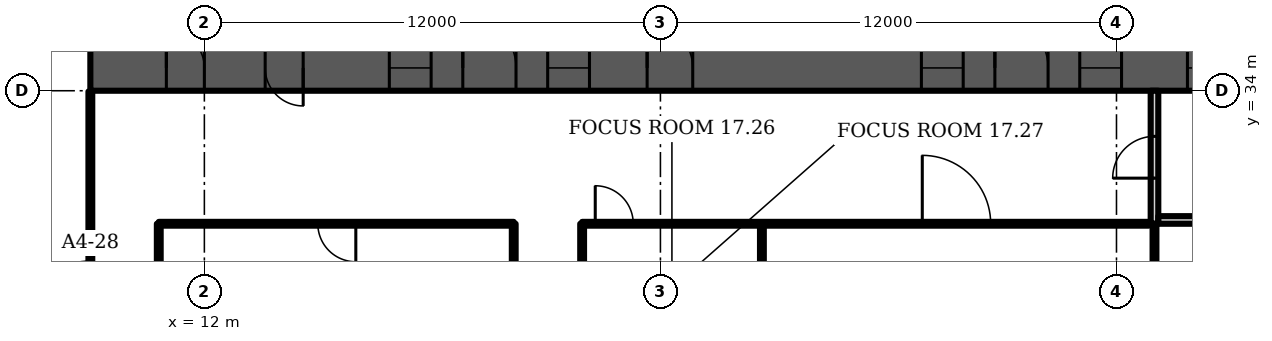
"""IFC4 building model, lengths in metres.
Left out: names, types, materials, properties, quantities, classifications, styles, units other than length and angle.
Written with IfcOpenShell. Run it as: python <this file> out.ifc"""

import sys

from ifc_helpers import new_model, si_unit, direction, frame, frame_2d, origin, place, context, subcontext, project, spatial, rectangle, extrude, element, fill, save


model = new_model("IFC4")
c1 = context("Model", 3, precision=1e-05, world=origin(), true_north=direction((0.0, 1.0)))
c2 = subcontext(c1, "Body", "Model", "MODEL_VIEW")
j1 = project(units=[si_unit("LENGTHUNIT", "METRE"), si_unit("PLANEANGLEUNIT", "RADIAN")], contexts=[c1])
p1 = place(None, origin())
s1 = spatial("IfcSite", under=j1, at=p1, CompositionType="ELEMENT")
p2 = place(p1, origin())
s2 = spatial("IfcBuilding", under=s1, at=p2, CompositionType="ELEMENT")
p3 = place(p2, frame((0.0, 0.0, 81.1)))
s3 = spatial("IfcBuildingStorey", under=s2, at=p3, CompositionType="ELEMENT", Elevation=81.1)
p4 = place(p3, frame((9.0, 34.6, 0.0), z_axis=(0.0, 0.0, 1.0), x_axis=(1.0, 0.0, 0.0)))
e1 = element("IfcWall", 1, at=p4, inside=s3, PredefinedType="SHEAR", context=c2, shape_type="SweptSolid", body=[
    extrude(rectangle(XDim=56.0, YDim=1.2, at=frame_2d((28.0, 0.0))), origin(), (0.0, 0.0, 1.0), 3.6),
])
p5 = place(p4, frame((2.0, 0.0, 0.0)))
e2 = element("IfcOpeningElement", 2, at=p5, cuts=e1, PredefinedType="OPENING", context=c2, shape_type="SweptSolid", body=[
    extrude(rectangle(XDim=1.0, YDim=2.1, at=frame_2d((0.5, 1.05))), frame((0.0, 0.61, 0.0), z_axis=(0.0, -1.0, 0.0), x_axis=(1.0, 0.0, 0.0)), (0.0, 0.0, 1.0), 1.22),
])
p6 = place(p4, frame((4.6, 0.0, 0.0)))
e3 = element("IfcOpeningElement", 3, at=p6, cuts=e1, PredefinedType="OPENING", context=c2, shape_type="SweptSolid", body=[
    extrude(rectangle(XDim=1.0, YDim=2.1, at=frame_2d((0.5, 1.05))), frame((0.0, 0.61, 0.0), z_axis=(0.0, -1.0, 0.0), x_axis=(1.0, 0.0, 0.0)), (0.0, 0.0, 1.0), 1.22),
])
p7 = place(p4, frame((7.867, 0.0, 0.0)))
e4 = element("IfcOpeningElement", 4, at=p7, cuts=e1, PredefinedType="OPENING", context=c2, shape_type="SweptSolid", body=[
    extrude(rectangle(XDim=1.1, YDim=2.1, at=frame_2d((0.55, 1.05))), frame((0.0, 0.61, 0.0), z_axis=(0.0, -1.0, 0.0), x_axis=(1.0, 0.0, 0.0)), (0.0, 0.0, 1.0), 1.22),
])
p8 = place(p4, frame((12.033, 0.0, 0.0)))
e5 = element("IfcOpeningElement", 5, at=p8, cuts=e1, PredefinedType="OPENING", context=c2, shape_type="SweptSolid", body=[
    extrude(rectangle(XDim=1.1, YDim=2.1, at=frame_2d((0.55, 1.05))), frame((0.0, 0.61, 0.0), z_axis=(0.0, -1.0, 0.0), x_axis=(1.0, 0.0, 0.0)), (0.0, 0.0, 1.0), 1.22),
])
p9 = place(p4, frame((9.8, 0.0, 0.0)))
e6 = element("IfcOpeningElement", 6, at=p9, cuts=e1, PredefinedType="OPENING", context=c2, shape_type="SweptSolid", body=[
    extrude(rectangle(XDim=1.4, YDim=2.1, at=frame_2d((0.7, 1.05))), frame((0.0, 0.61, 0.0), z_axis=(0.0, -1.0, 0.0), x_axis=(1.0, 0.0, 0.0)), (0.0, 0.0, 1.0), 1.22),
])
p10 = place(p4, frame((14.65, 0.0, 0.0)))
e7 = element("IfcOpeningElement", 7, at=p10, cuts=e1, PredefinedType="OPENING", context=c2, shape_type="SweptSolid", body=[
    extrude(rectangle(XDim=1.2, YDim=2.1, at=frame_2d((0.6, 1.05))), frame((0.0, 0.61, 0.0), z_axis=(0.0, -1.0, 0.0), x_axis=(1.0, 0.0, 0.0)), (0.0, 0.0, 1.0), 1.22),
])
p11 = place(p4, frame((21.867, 0.0, 0.0)))
e8 = element("IfcOpeningElement", 8, at=p11, cuts=e1, PredefinedType="OPENING", context=c2, shape_type="SweptSolid", body=[
    extrude(rectangle(XDim=1.1, YDim=2.1, at=frame_2d((0.55, 1.05))), frame((0.0, 0.61, 0.0), z_axis=(0.0, -1.0, 0.0), x_axis=(1.0, 0.0, 0.0)), (0.0, 0.0, 1.0), 1.22),
])
p12 = place(p4, frame((26.033, 0.0, 0.0)))
e9 = element("IfcOpeningElement", 9, at=p12, cuts=e1, PredefinedType="OPENING", context=c2, shape_type="SweptSolid", body=[
    extrude(rectangle(XDim=1.1, YDim=2.1, at=frame_2d((0.55, 1.05))), frame((0.0, 0.61, 0.0), z_axis=(0.0, -1.0, 0.0), x_axis=(1.0, 0.0, 0.0)), (0.0, 0.0, 1.0), 1.22),
])
p13 = place(p4, frame((23.8, 0.0, 0.0)))
e10 = element("IfcOpeningElement", 10, at=p13, cuts=e1, PredefinedType="OPENING", context=c2, shape_type="SweptSolid", body=[
    extrude(rectangle(XDim=1.4, YDim=2.1, at=frame_2d((0.7, 1.05))), frame((0.0, 0.61, 0.0), z_axis=(0.0, -1.0, 0.0), x_axis=(1.0, 0.0, 0.0)), (0.0, 0.0, 1.0), 1.22),
])
p14 = place(p4, frame((28.867, 0.0, 0.0)))
e11 = element("IfcOpeningElement", 11, at=p14, cuts=e1, PredefinedType="OPENING", context=c2, shape_type="SweptSolid", body=[
    extrude(rectangle(XDim=1.1, YDim=2.1, at=frame_2d((0.55, 1.05))), frame((0.0, 0.61, 0.0), z_axis=(0.0, -1.0, 0.0), x_axis=(1.0, 0.0, 0.0)), (0.0, 0.0, 1.0), 1.22),
])
p15 = place(p4, frame((33.033, 0.0, 0.0)))
e12 = element("IfcOpeningElement", 12, at=p15, cuts=e1, PredefinedType="OPENING", context=c2, shape_type="SweptSolid", body=[
    extrude(rectangle(XDim=1.1, YDim=2.1, at=frame_2d((0.55, 1.05))), frame((0.0, 0.61, 0.0), z_axis=(0.0, -1.0, 0.0), x_axis=(1.0, 0.0, 0.0)), (0.0, 0.0, 1.0), 1.22),
])
p16 = place(p4, frame((40.15, 0.0, 0.0)))
e13 = element("IfcOpeningElement", 13, at=p16, cuts=e1, PredefinedType="OPENING", context=c2, shape_type="SweptSolid", body=[
    extrude(rectangle(XDim=1.2, YDim=2.1, at=frame_2d((0.6, 1.05))), frame((0.0, 0.61, 0.0), z_axis=(0.0, -1.0, 0.0), x_axis=(1.0, 0.0, 0.0)), (0.0, 0.0, 1.0), 1.22),
])
p17 = place(p4, frame((44.8, 0.0, 0.0)))
e14 = element("IfcOpeningElement", 14, at=p17, cuts=e1, PredefinedType="OPENING", context=c2, shape_type="SweptSolid", body=[
    extrude(rectangle(XDim=1.4, YDim=2.1, at=frame_2d((0.7, 1.05))), frame((0.0, 0.61, 0.0), z_axis=(0.0, -1.0, 0.0), x_axis=(1.0, 0.0, 0.0)), (0.0, 0.0, 1.0), 1.22),
])
p18 = place(p4, frame((49.867, 0.0, 0.0)))
e15 = element("IfcOpeningElement", 15, at=p18, cuts=e1, PredefinedType="OPENING", context=c2, shape_type="SweptSolid", body=[
    extrude(rectangle(XDim=1.1, YDim=2.1, at=frame_2d((0.55, 1.05))), frame((0.0, 0.61, 0.0), z_axis=(0.0, -1.0, 0.0), x_axis=(1.0, 0.0, 0.0)), (0.0, 0.0, 1.0), 1.22),
])
p19 = place(p4, frame((53.5, 0.0, 0.0)))
e16 = element("IfcOpeningElement", 16, at=p19, cuts=e1, PredefinedType="OPENING", context=c2, shape_type="SweptSolid", body=[
    extrude(rectangle(XDim=1.1, YDim=2.1, at=frame_2d((0.55, 1.05))), frame((0.0, 0.61, 0.0), z_axis=(0.0, -1.0, 0.0), x_axis=(1.0, 0.0, 0.0)), (0.0, 0.0, 1.0), 1.22),
])
p20 = place(p4, frame((51.567, 0.0, 0.0)))
e17 = element("IfcOpeningElement", 17, at=p20, cuts=e1, PredefinedType="OPENING", context=c2, shape_type="SweptSolid", body=[
    extrude(rectangle(XDim=1.4, YDim=2.1, at=frame_2d((0.7, 1.05))), frame((0.0, 0.61, 0.0), z_axis=(0.0, -1.0, 0.0), x_axis=(1.0, 0.0, 0.0)), (0.0, 0.0, 1.0), 1.22),
])
p21 = place(p3, frame((37.0, 30.5, 0.0), z_axis=(0.0, 0.0, 1.0), x_axis=(0.0, 1.0, 0.0)))
e18 = element("IfcWall", 18, at=p21, inside=s3, PredefinedType="PARTITIONING", context=c2, shape_type="SweptSolid", body=[
    extrude(rectangle(XDim=3.5, YDim=0.2, at=frame_2d((1.75, 0.0))), origin(), (0.0, 0.0, 1.0), 3.2),
])
p22 = place(p21, frame((1.2, 0.0, 0.0)))
e19 = element("IfcOpeningElement", 19, at=p22, cuts=e18, PredefinedType="OPENING", context=c2, shape_type="SweptSolid", body=[
    extrude(rectangle(XDim=1.1, YDim=2.1, at=frame_2d((0.55, 1.05))), frame((0.0, 0.11, 0.0), z_axis=(0.0, -1.0, 0.0), x_axis=(1.0, 0.0, 0.0)), (0.0, 0.0, 1.0), 0.22),
])
p23 = place(p3, frame((37.1, 30.6, 0.0), z_axis=(0.0, 0.0, 1.0), x_axis=(1.0, 0.0, 0.0)))
e20 = element("IfcWall", 20, at=p23, inside=s3, PredefinedType="PARTITIONING", context=c2, shape_type="SweptSolid", body=[
    extrude(rectangle(XDim=2.8, YDim=0.2, at=frame_2d((1.4, 0.0))), origin(), (0.0, 0.0, 1.0), 3.2),
])
p24 = place(p3, frame((9.0, 26.02, 0.0), z_axis=(0.0, 0.0, 1.0), x_axis=(0.0, 1.0, 0.0)))
e21 = element("IfcWall", 21, at=p24, inside=s3, PredefinedType="PARTITIONING", context=c2, shape_type="SweptSolid", body=[
    extrude(rectangle(XDim=7.96, YDim=0.1, at=frame_2d((3.98, 0.0))), origin(), (0.0, 0.0, 1.0), 3.2),
])
p25 = place(p24, frame((1.7, 0.0, 0.0)))
e22 = element("IfcOpeningElement", 22, at=p25, cuts=e21, PredefinedType="OPENING", context=c2, shape_type="SweptSolid", body=[
    extrude(rectangle(XDim=1.8, YDim=2.1, at=frame_2d((0.9, 1.05))), frame((0.0, 0.06, 0.0), z_axis=(0.0, -1.0, 0.0), x_axis=(1.0, 0.0, 0.0)), (0.0, 0.0, 1.0), 0.12),
])
p26 = place(p3, frame((10.8, 21.6, 0.0), z_axis=(0.0, 0.0, 1.0), x_axis=(0.0, 1.0, 0.0)))
e23 = element("IfcWall", 23, at=p26, inside=s3, PredefinedType="PARTITIONING", context=c2, shape_type="SweptSolid", body=[
    extrude(rectangle(XDim=8.9, YDim=0.1, at=frame_2d((4.45, 0.0))), origin(), (0.0, 0.0, 1.0), 3.2),
])
p27 = place(p3, frame((10.8, 30.5, 0.0), z_axis=(0.0, 0.0, 1.0), x_axis=(1.0, 0.0, 0.0)))
e24 = element("IfcWall", 24, at=p27, inside=s3, PredefinedType="PARTITIONING", context=c2, shape_type="SweptSolid", body=[
    extrude(rectangle(XDim=9.34, YDim=0.1, at=frame_2d((4.67, 0.0))), origin(), (0.0, 0.0, 1.0), 3.2),
])
p28 = place(p27, frame((4.185, 0.0, 0.0)))
e25 = element("IfcOpeningElement", 25, at=p28, cuts=e24, PredefinedType="OPENING", context=c2, shape_type="SweptSolid", body=[
    extrude(rectangle(XDim=1.0, YDim=2.1, at=frame_2d((0.5, 1.05))), frame((0.0, 0.06, 0.0), z_axis=(0.0, -1.0, 0.0), x_axis=(1.0, 0.0, 0.0)), (0.0, 0.0, 1.0), 0.12),
])
p29 = place(p3, frame((20.14, -1.13, 0.0), z_axis=(0.0, 0.0, 1.0), x_axis=(0.0, 1.0, 0.0)))
e26 = element("IfcWall", 26, at=p29, inside=s3, PredefinedType="PARTITIONING", context=c2, shape_type="SweptSolid", body=[
    extrude(rectangle(XDim=31.63, YDim=0.1, at=frame_2d((15.815, 0.0))), origin(), (0.0, 0.0, 1.0), 3.2),
])
p30 = place(p29, frame((1.825, 0.0, 0.0)))
e27 = element("IfcOpeningElement", 27, at=p30, cuts=e26, PredefinedType="OPENING", context=c2, shape_type="SweptSolid", body=[
    extrude(rectangle(XDim=1.0, YDim=2.1, at=frame_2d((0.5, 1.05))), frame((0.0, 0.06, 0.0), z_axis=(0.0, -1.0, 0.0), x_axis=(1.0, 0.0, 0.0)), (0.0, 0.0, 1.0), 0.12),
])
p31 = place(p29, frame((6.305, 0.0, 0.0)))
e28 = element("IfcOpeningElement", 28, at=p31, cuts=e26, PredefinedType="OPENING", context=c2, shape_type="SweptSolid", body=[
    extrude(rectangle(XDim=1.0, YDim=2.1, at=frame_2d((0.5, 1.05))), frame((0.0, 0.06, 0.0), z_axis=(0.0, -1.0, 0.0), x_axis=(1.0, 0.0, 0.0)), (0.0, 0.0, 1.0), 0.12),
])
p32 = place(p29, frame((11.35, 0.0, 0.0)))
e29 = element("IfcOpeningElement", 29, at=p32, cuts=e26, PredefinedType="OPENING", context=c2, shape_type="SweptSolid", body=[
    extrude(rectangle(XDim=1.0, YDim=2.1, at=frame_2d((0.5, 1.05))), frame((0.0, 0.06, 0.0), z_axis=(0.0, -1.0, 0.0), x_axis=(1.0, 0.0, 0.0)), (0.0, 0.0, 1.0), 0.12),
])
p33 = place(p29, frame((15.985, 0.0, 0.0)))
e30 = element("IfcOpeningElement", 30, at=p33, cuts=e26, PredefinedType="OPENING", context=c2, shape_type="SweptSolid", body=[
    extrude(rectangle(XDim=1.0, YDim=2.1, at=frame_2d((0.5, 1.05))), frame((0.0, 0.06, 0.0), z_axis=(0.0, -1.0, 0.0), x_axis=(1.0, 0.0, 0.0)), (0.0, 0.0, 1.0), 0.12),
])
p34 = place(p29, frame((20.38, 0.0, 0.0)))
e31 = element("IfcOpeningElement", 31, at=p34, cuts=e26, PredefinedType="OPENING", context=c2, shape_type="SweptSolid", body=[
    extrude(rectangle(XDim=1.0, YDim=2.1, at=frame_2d((0.5, 1.05))), frame((0.0, 0.06, 0.0), z_axis=(0.0, -1.0, 0.0), x_axis=(1.0, 0.0, 0.0)), (0.0, 0.0, 1.0), 0.12),
])
p35 = place(p29, frame((24.695, 0.0, 0.0)))
e32 = element("IfcOpeningElement", 32, at=p35, cuts=e26, PredefinedType="OPENING", context=c2, shape_type="SweptSolid", body=[
    extrude(rectangle(XDim=1.0, YDim=2.1, at=frame_2d((0.5, 1.05))), frame((0.0, 0.06, 0.0), z_axis=(0.0, -1.0, 0.0), x_axis=(1.0, 0.0, 0.0)), (0.0, 0.0, 1.0), 0.12),
])
p36 = place(p3, frame((21.94, -1.29, 0.0), z_axis=(0.0, 0.0, 1.0), x_axis=(0.0, 1.0, 0.0)))
e33 = element("IfcWall", 33, at=p36, inside=s3, PredefinedType="PARTITIONING", context=c2, shape_type="SweptSolid", body=[
    extrude(rectangle(XDim=31.79, YDim=0.1, at=frame_2d((15.895, 0.0))), origin(), (0.0, 0.0, 1.0), 3.2),
])
p37 = place(p36, frame((1.82, 0.0, 0.0)))
e34 = element("IfcOpeningElement", 34, at=p37, cuts=e33, PredefinedType="OPENING", context=c2, shape_type="SweptSolid", body=[
    extrude(rectangle(XDim=1.0, YDim=2.1, at=frame_2d((0.5, 1.05))), frame((0.0, 0.06, 0.0), z_axis=(0.0, -1.0, 0.0), x_axis=(1.0, 0.0, 0.0)), (0.0, 0.0, 1.0), 0.12),
])
p38 = place(p36, frame((6.63, 0.0, 0.0)))
e35 = element("IfcOpeningElement", 35, at=p38, cuts=e33, PredefinedType="OPENING", context=c2, shape_type="SweptSolid", body=[
    extrude(rectangle(XDim=1.0, YDim=2.1, at=frame_2d((0.5, 1.05))), frame((0.0, 0.06, 0.0), z_axis=(0.0, -1.0, 0.0), x_axis=(1.0, 0.0, 0.0)), (0.0, 0.0, 1.0), 0.12),
])
p39 = place(p36, frame((11.59, 0.0, 0.0)))
e36 = element("IfcOpeningElement", 36, at=p39, cuts=e33, PredefinedType="OPENING", context=c2, shape_type="SweptSolid", body=[
    extrude(rectangle(XDim=1.0, YDim=2.1, at=frame_2d((0.5, 1.05))), frame((0.0, 0.06, 0.0), z_axis=(0.0, -1.0, 0.0), x_axis=(1.0, 0.0, 0.0)), (0.0, 0.0, 1.0), 0.12),
])
p40 = place(p36, frame((15.55, 0.0, 0.0)))
e37 = element("IfcOpeningElement", 37, at=p40, cuts=e33, PredefinedType="OPENING", context=c2, shape_type="SweptSolid", body=[
    extrude(rectangle(XDim=1.0, YDim=2.1, at=frame_2d((0.5, 1.05))), frame((0.0, 0.06, 0.0), z_axis=(0.0, -1.0, 0.0), x_axis=(1.0, 0.0, 0.0)), (0.0, 0.0, 1.0), 0.12),
])
p41 = place(p36, frame((18.425, 0.0, 0.0)))
e38 = element("IfcOpeningElement", 38, at=p41, cuts=e33, PredefinedType="OPENING", context=c2, shape_type="SweptSolid", body=[
    extrude(rectangle(XDim=1.0, YDim=2.1, at=frame_2d((0.5, 1.05))), frame((0.0, 0.06, 0.0), z_axis=(0.0, -1.0, 0.0), x_axis=(1.0, 0.0, 0.0)), (0.0, 0.0, 1.0), 0.12),
])
p42 = place(p36, frame((21.305, 0.0, 0.0)))
e39 = element("IfcOpeningElement", 39, at=p42, cuts=e33, PredefinedType="OPENING", context=c2, shape_type="SweptSolid", body=[
    extrude(rectangle(XDim=1.0, YDim=2.1, at=frame_2d((0.5, 1.05))), frame((0.0, 0.06, 0.0), z_axis=(0.0, -1.0, 0.0), x_axis=(1.0, 0.0, 0.0)), (0.0, 0.0, 1.0), 0.12),
])
p43 = place(p36, frame((24.18, 0.0, 0.0)))
e40 = element("IfcOpeningElement", 40, at=p43, cuts=e33, PredefinedType="OPENING", context=c2, shape_type="SweptSolid", body=[
    extrude(rectangle(XDim=1.0, YDim=2.1, at=frame_2d((0.5, 1.05))), frame((0.0, 0.06, 0.0), z_axis=(0.0, -1.0, 0.0), x_axis=(1.0, 0.0, 0.0)), (0.0, 0.0, 1.0), 0.12),
])
p44 = place(p36, frame((27.055, 0.0, 0.0)))
e41 = element("IfcOpeningElement", 41, at=p44, cuts=e33, PredefinedType="OPENING", context=c2, shape_type="SweptSolid", body=[
    extrude(rectangle(XDim=1.0, YDim=2.1, at=frame_2d((0.5, 1.05))), frame((0.0, 0.06, 0.0), z_axis=(0.0, -1.0, 0.0), x_axis=(1.0, 0.0, 0.0)), (0.0, 0.0, 1.0), 0.12),
])
p45 = place(p3, frame((21.94, 30.5, 0.0), z_axis=(0.0, 0.0, 1.0), x_axis=(1.0, 0.0, 0.0)))
e42 = element("IfcWall", 42, at=p45, inside=s3, PredefinedType="PARTITIONING", context=c2, shape_type="SweptSolid", body=[
    extrude(rectangle(XDim=14.91, YDim=0.1, at=frame_2d((7.455, 0.0))), origin(), (0.0, 0.0, 1.0), 3.2),
])
p46 = place(p45, frame((0.345, 0.0, 0.0)))
e43 = element("IfcOpeningElement", 43, at=p46, cuts=e42, PredefinedType="OPENING", context=c2, shape_type="SweptSolid", body=[
    extrude(rectangle(XDim=1.0, YDim=2.1, at=frame_2d((0.5, 1.05))), frame((0.0, 0.06, 0.0), z_axis=(0.0, -1.0, 0.0), x_axis=(1.0, 0.0, 0.0)), (0.0, 0.0, 1.0), 0.12),
])
p47 = place(p45, frame((8.95, 0.0, 0.0)))
e44 = element("IfcOpeningElement", 44, at=p47, cuts=e42, PredefinedType="OPENING", context=c2, shape_type="SweptSolid", body=[
    extrude(rectangle(XDim=1.8, YDim=2.1, at=frame_2d((0.9, 1.05))), frame((0.0, 0.06, 0.0), z_axis=(0.0, -1.0, 0.0), x_axis=(1.0, 0.0, 0.0)), (0.0, 0.0, 1.0), 0.12),
])
p48 = place(p3, frame((26.67, 16.115, 0.0), z_axis=(0.0, 0.0, 1.0), x_axis=(0.0, 1.0, 0.0)))
e45 = element("IfcWall", 45, at=p48, inside=s3, PredefinedType="PARTITIONING", context=c2, shape_type="SweptSolid", body=[
    extrude(rectangle(XDim=14.385, YDim=0.1, at=frame_2d((7.192, 0.0))), origin(), (0.0, 0.0, 1.0), 3.2),
])
p49 = place(p3, frame((37.0, 13.24, 0.0), z_axis=(0.0, 0.0, 1.0), x_axis=(0.0, 1.0, 0.0)))
e46 = element("IfcWall", 46, at=p49, inside=s3, PredefinedType="PARTITIONING", context=c2, shape_type="SweptSolid", body=[
    extrude(rectangle(XDim=17.26, YDim=0.1, at=frame_2d((8.63, 0.0))), origin(), (0.0, 0.0, 1.0), 3.2),
])
p50 = place(p5, origin())
e47 = element("IfcDoor", 47, at=p50, inside=s3, OperationType="SINGLE_SWING_LEFT", PredefinedType="DOOR", context=c2, shape_type="SweptSolid", body=[
    extrude(rectangle(XDim=1.0, YDim=2.1, at=frame_2d((0.5, 1.05))), frame((0.0, 0.6, 0.0), z_axis=(0.0, -1.0, 0.0), x_axis=(1.0, 0.0, 0.0)), (0.0, 0.0, 1.0), 1.199),
])
fill(e2, e47)
p51 = place(p6, origin())
e48 = element("IfcDoor", 48, at=p51, inside=s3, OperationType="SINGLE_SWING_RIGHT", PredefinedType="DOOR", context=c2, shape_type="SweptSolid", body=[
    extrude(rectangle(XDim=1.0, YDim=2.1, at=frame_2d((0.5, 1.05))), frame((0.0, 0.6, 0.0), z_axis=(0.0, -1.0, 0.0), x_axis=(1.0, 0.0, 0.0)), (0.0, 0.0, 1.0), 1.199),
])
fill(e3, e48)
p52 = place(p7, origin())
e49 = element("IfcDoor", 49, at=p52, inside=s3, OperationType="DOUBLE_DOOR_SLIDING", PredefinedType="DOOR", context=c2, shape_type="SweptSolid", body=[
    extrude(rectangle(XDim=1.1, YDim=2.1, at=frame_2d((0.55, 1.05))), frame((0.0, 0.025, 0.0), z_axis=(0.0, -1.0, 0.0), x_axis=(1.0, 0.0, 0.0)), (0.0, 0.0, 1.0), 0.05),
])
fill(e4, e49)
p53 = place(p8, origin())
e50 = element("IfcDoor", 50, at=p53, inside=s3, OperationType="DOUBLE_DOOR_SLIDING", PredefinedType="DOOR", context=c2, shape_type="SweptSolid", body=[
    extrude(rectangle(XDim=1.1, YDim=2.1, at=frame_2d((0.55, 1.05))), frame((0.0, 0.025, 0.0), z_axis=(0.0, -1.0, 0.0), x_axis=(1.0, 0.0, 0.0)), (0.0, 0.0, 1.0), 0.05),
])
fill(e5, e50)
p54 = place(p9, origin())
e51 = element("IfcDoor", 51, at=p54, inside=s3, OperationType="DOUBLE_DOOR_SINGLE_SWING", PredefinedType="DOOR", context=c2, shape_type="SweptSolid", body=[
    extrude(rectangle(XDim=1.4, YDim=2.1, at=frame_2d((0.7, 1.05))), frame((0.0, 0.025, 0.0), z_axis=(0.0, -1.0, 0.0), x_axis=(1.0, 0.0, 0.0)), (0.0, 0.0, 1.0), 0.05),
])
fill(e6, e51)
p55 = place(p10, origin())
e52 = element("IfcDoor", 52, at=p55, inside=s3, OperationType="SINGLE_SWING_LEFT", PredefinedType="DOOR", context=c2, shape_type="SweptSolid", body=[
    extrude(rectangle(XDim=1.2, YDim=2.1, at=frame_2d((0.6, 1.05))), frame((0.0, 0.025, 0.0), z_axis=(0.0, -1.0, 0.0), x_axis=(1.0, 0.0, 0.0)), (0.0, 0.0, 1.0), 0.05),
])
fill(e7, e52)
p56 = place(p11, origin())
e53 = element("IfcDoor", 53, at=p56, inside=s3, OperationType="DOUBLE_DOOR_SLIDING", PredefinedType="DOOR", context=c2, shape_type="SweptSolid", body=[
    extrude(rectangle(XDim=1.1, YDim=2.1, at=frame_2d((0.55, 1.05))), frame((0.0, 0.025, 0.0), z_axis=(0.0, -1.0, 0.0), x_axis=(1.0, 0.0, 0.0)), (0.0, 0.0, 1.0), 0.05),
])
fill(e8, e53)
p57 = place(p12, origin())
e54 = element("IfcDoor", 54, at=p57, inside=s3, OperationType="DOUBLE_DOOR_SLIDING", PredefinedType="DOOR", context=c2, shape_type="SweptSolid", body=[
    extrude(rectangle(XDim=1.1, YDim=2.1, at=frame_2d((0.55, 1.05))), frame((0.0, 0.025, 0.0), z_axis=(0.0, -1.0, 0.0), x_axis=(1.0, 0.0, 0.0)), (0.0, 0.0, 1.0), 0.05),
])
fill(e9, e54)
p58 = place(p13, origin())
e55 = element("IfcDoor", 55, at=p58, inside=s3, OperationType="DOUBLE_DOOR_SINGLE_SWING", PredefinedType="DOOR", context=c2, shape_type="SweptSolid", body=[
    extrude(rectangle(XDim=1.4, YDim=2.1, at=frame_2d((0.7, 1.05))), frame((0.0, 0.025, 0.0), z_axis=(0.0, -1.0, 0.0), x_axis=(1.0, 0.0, 0.0)), (0.0, 0.0, 1.0), 0.05),
])
fill(e10, e55)
p59 = place(p14, origin())
e56 = element("IfcDoor", 56, at=p59, inside=s3, OperationType="DOUBLE_DOOR_SLIDING", PredefinedType="DOOR", context=c2, shape_type="SweptSolid", body=[
    extrude(rectangle(XDim=1.1, YDim=2.1, at=frame_2d((0.55, 1.05))), frame((0.0, 0.025, 0.0), z_axis=(0.0, -1.0, 0.0), x_axis=(1.0, 0.0, 0.0)), (0.0, 0.0, 1.0), 0.05),
])
fill(e11, e56)
p60 = place(p22, origin())
e57 = element("IfcDoor", 57, at=p60, inside=s3, OperationType="SINGLE_SWING_LEFT", PredefinedType="DOOR", context=c2, shape_type="SweptSolid", body=[
    extrude(rectangle(XDim=1.1, YDim=2.1, at=frame_2d((0.55, 1.05))), frame((0.0, 0.025, 0.0), z_axis=(0.0, -1.0, 0.0), x_axis=(1.0, 0.0, 0.0)), (0.0, 0.0, 1.0), 0.05),
])
fill(e19, e57)
p61 = place(p25, origin())
e58 = element("IfcDoor", 58, at=p61, inside=s3, OperationType="DOUBLE_DOOR_SINGLE_SWING", PredefinedType="DOOR", context=c2, shape_type="SweptSolid", body=[
    extrude(rectangle(XDim=1.8, YDim=2.1, at=frame_2d((0.9, 1.05))), frame((0.0, 0.025, 0.0), z_axis=(0.0, -1.0, 0.0), x_axis=(1.0, 0.0, 0.0)), (0.0, 0.0, 1.0), 0.05),
])
fill(e22, e58)
p62 = place(p28, origin())
e59 = element("IfcDoor", 59, at=p62, inside=s3, OperationType="SINGLE_SWING_RIGHT", PredefinedType="DOOR", context=c2, shape_type="SweptSolid", body=[
    extrude(rectangle(XDim=1.0, YDim=2.1, at=frame_2d((0.5, 1.05))), frame((0.0, 0.025, 0.0), z_axis=(0.0, -1.0, 0.0), x_axis=(1.0, 0.0, 0.0)), (0.0, 0.0, 1.0), 0.05),
])
fill(e25, e59)
p63 = place(p46, origin())
e60 = element("IfcDoor", 60, at=p63, inside=s3, OperationType="SINGLE_SWING_LEFT", PredefinedType="DOOR", context=c2, shape_type="SweptSolid", body=[
    extrude(rectangle(XDim=1.0, YDim=2.1, at=frame_2d((0.5, 1.05))), frame((0.0, 0.025, 0.0), z_axis=(0.0, -1.0, 0.0), x_axis=(1.0, 0.0, 0.0)), (0.0, 0.0, 1.0), 0.05),
])
fill(e43, e60)
p64 = place(p47, origin())
e61 = element("IfcDoor", 61, at=p64, inside=s3, OperationType="DOUBLE_DOOR_SINGLE_SWING", PredefinedType="DOOR", context=c2, shape_type="SweptSolid", body=[
    extrude(rectangle(XDim=1.8, YDim=2.1, at=frame_2d((0.9, 1.05))), frame((0.0, 0.025, 0.0), z_axis=(0.0, -1.0, 0.0), x_axis=(1.0, 0.0, 0.0)), (0.0, 0.0, 1.0), 0.05),
])
fill(e44, e61)
save(model, sys.argv[1])
